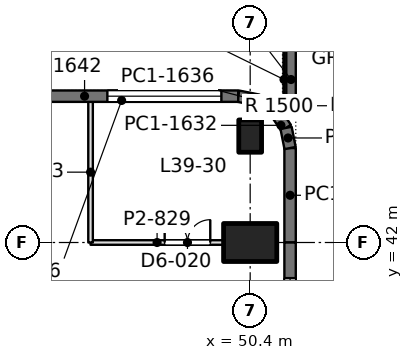
"""IFC4 building model, lengths in metres.
Left out: names, types, materials, properties, quantities, classifications, styles, units other than length and angle.
Written with IfcOpenShell. Run it as: python <this file> out.ifc"""

import sys

from ifc_helpers import new_model, si_unit, direction, frame, frame_2d, origin, origin_2d, place, context, subcontext, project, spatial, rectangle, extrude, element, fill, save


model = new_model("IFC4")
c1 = context("Model", 3, precision=1e-05, world=origin(), true_north=direction((0.0, 1.0)))
c2 = subcontext(c1, "Body", "Model", "MODEL_VIEW")
j1 = project(units=[si_unit("LENGTHUNIT", "METRE"), si_unit("PLANEANGLEUNIT", "RADIAN")], contexts=[c1])
p1 = place(None, origin())
s1 = spatial("IfcSite", under=j1, at=p1, CompositionType="ELEMENT")
p2 = place(p1, origin())
s2 = spatial("IfcBuilding", under=s1, at=p2, CompositionType="ELEMENT")
p3 = place(p2, frame((0.0, 0.0, 173.4)))
s3 = spatial("IfcBuildingStorey", under=s2, at=p3, CompositionType="ELEMENT", Elevation=173.4)
p4 = place(p3, frame((50.4, 42.0, 0.0), z_axis=(0.0, 0.0, 1.0), x_axis=(0.0, 1.0, 0.0)))
e1 = element("IfcColumn", 1, at=p4, inside=s3, PredefinedType="COLUMN", context=c2, shape_type="SweptSolid", body=[
    extrude(rectangle(XDim=1.0, YDim=1.4, at=origin_2d()), origin(), (0.0, 0.0, 1.0), 4.2),
])
p5 = place(p3, frame((50.4, 44.8, -0.36), z_axis=(0.0, 0.0, 1.0), x_axis=(1.0, 0.0, 0.0)))
e2 = element("IfcColumn", 2, at=p5, inside=s3, PredefinedType="COLUMN", context=c2, shape_type="SweptSolid", body=[
    extrude(rectangle(XDim=0.6, YDim=0.85, at=origin_2d()), origin(), (0.0, 0.0, 1.0), 4.56),
])
p6 = place(p3, frame((42.0, 45.85, 0.0), z_axis=(0.0, 0.0, 1.0), x_axis=(1.0, 0.0, 0.0)))
e3 = element("IfcWall", 3, at=p6, inside=s3, PredefinedType="SOLIDWALL", context=c2, shape_type="SweptSolid", body=[
    extrude(rectangle(XDim=8.085, YDim=0.3, at=frame_2d((4.042, 0.0))), origin(), (0.0, 0.0, 1.0), 4.05),
])
p7 = place(p6, frame((4.643, 0.0, 0.9)))
e4 = element("IfcOpeningElement", 4, at=p7, cuts=e3, PredefinedType="OPENING", context=c2, shape_type="SweptSolid", body=[
    extrude(rectangle(XDim=3.0, YDim=1.9, at=frame_2d((1.5, 0.95))), frame((0.0, 0.16, 0.0), z_axis=(0.0, -1.0, 0.0), x_axis=(1.0, 0.0, 0.0)), (0.0, 0.0, 1.0), 0.32),
])
p8 = place(p6, frame((1.443, 0.0, 0.0)))
e5 = element("IfcOpeningElement", 5, at=p8, cuts=e3, PredefinedType="OPENING", context=c2, shape_type="SweptSolid", body=[
    extrude(rectangle(XDim=1.0, YDim=2.4, at=frame_2d((0.5, 1.2))), frame((0.0, 0.16, 0.0), z_axis=(0.0, -1.0, 0.0), x_axis=(1.0, 0.0, 0.0)), (0.0, 0.0, 1.0), 0.32),
])
p9 = place(p3, frame((50.085, 45.85, 0.0), z_axis=(0.0, 0.0, 1.0), x_axis=(0.980702050465, -0.1955082817, 0.0)))
e6 = element("IfcWall", 6, at=p9, inside=s3, PredefinedType="SOLIDWALL", context=c2, shape_type="SweptSolid", body=[
    extrude(rectangle(XDim=0.541, YDim=0.3, at=frame_2d((0.271, 0.0))), origin(), (0.0, 0.0, 1.0), 4.05),
])
p10 = place(p3, frame((50.615, 45.744, 0.0), z_axis=(0.0, 0.0, 1.0), x_axis=(0.831692711774, -0.555236195849, 0.0)))
e7 = element("IfcWall", 7, at=p10, inside=s3, PredefinedType="SOLIDWALL", context=c2, shape_type="SweptSolid", body=[
    extrude(rectangle(XDim=0.525, YDim=0.3, at=frame_2d((0.263, 0.0))), origin(), (0.0, 0.0, 1.0), 4.05),
])
p11 = place(p3, frame((51.052, 45.453, 0.0), z_axis=(0.0, 0.0, 1.0), x_axis=(0.55534295404, -0.831621430339, 0.0)))
e8 = element("IfcWall", 8, at=p11, inside=s3, PredefinedType="SOLIDWALL", context=c2, shape_type="SweptSolid", body=[
    extrude(rectangle(XDim=0.526, YDim=0.3, at=frame_2d((0.263, 0.0))), origin(), (0.0, 0.0, 1.0), 4.05),
])
p12 = place(p3, frame((51.344, 45.015, 0.0), z_axis=(0.0, 0.0, 1.0), x_axis=(0.195073962632, -0.980788534345, 0.0)))
e9 = element("IfcWall", 9, at=p12, inside=s3, PredefinedType="SOLIDWALL", context=c2, shape_type="SweptSolid", body=[
    extrude(rectangle(XDim=0.541, YDim=0.3, at=frame_2d((0.271, 0.0))), origin(), (0.0, 0.0, 1.0), 4.05),
])
p13 = place(p3, frame((51.45, 44.485, 0.0), z_axis=(0.0, 0.0, 1.0), x_axis=(0.0, -1.0, 0.0)))
e10 = element("IfcWall", 10, at=p13, inside=s3, PredefinedType="SOLIDWALL", context=c2, shape_type="SweptSolid", body=[
    extrude(rectangle(XDim=2.485, YDim=0.3, at=frame_2d((1.243, 0.0))), origin(), (0.0, 0.0, 1.0), 4.05),
])
p14 = place(p3, frame((51.45, 42.0, 0.0), z_axis=(0.0, 0.0, 1.0), x_axis=(0.0, -1.0, 0.0)))
e11 = element("IfcWall", 11, at=p14, inside=s3, PredefinedType="SOLIDWALL", context=c2, shape_type="SweptSolid", body=[
    extrude(rectangle(XDim=4.275, YDim=0.3, at=frame_2d((2.137, 0.0))), origin(), (0.0, 0.0, 1.0), 4.05),
])
p15 = place(p14, frame((0.938, 0.0, 0.9)))
e12 = element("IfcOpeningElement", 12, at=p15, cuts=e11, PredefinedType="OPENING", context=c2, shape_type="SweptSolid", body=[
    extrude(rectangle(XDim=2.4, YDim=1.9, at=frame_2d((1.2, 0.95))), frame((0.0, 0.16, 0.0), z_axis=(0.0, -1.0, 0.0), x_axis=(1.0, 0.0, 0.0)), (0.0, 0.0, 1.0), 0.32),
])
p16 = place(p3, frame((51.475, 47.3, -0.16), z_axis=(0.0, 0.0, 1.0), x_axis=(0.0, -1.0, 0.0)))
e13 = element("IfcWall", 13, at=p16, inside=s3, PredefinedType="PARAPET", context=c2, shape_type="SweptSolid", body=[
    extrude(rectangle(XDim=2.023, YDim=0.25, at=frame_2d((1.012, 0.0))), origin(), (0.0, 0.0, 1.0), 1.26),
])
p17 = place(p3, frame((46.2, 42.0, 0.0), z_axis=(0.0, 0.0, 1.0), x_axis=(1.0, 0.0, 0.0)))
e14 = element("IfcWall", 14, at=p17, inside=s3, PredefinedType="PARTITIONING", context=c2, shape_type="SweptSolid", body=[
    extrude(rectangle(XDim=3.501, YDim=0.12, at=frame_2d((1.75, 0.0))), origin(), (0.0, 0.0, 1.0), 3.55),
])
p18 = place(p17, frame((1.95, 0.0, 0.0)))
e15 = element("IfcOpeningElement", 15, at=p18, cuts=e14, PredefinedType="OPENING", context=c2, shape_type="SweptSolid", body=[
    extrude(rectangle(XDim=1.2, YDim=2.2, at=frame_2d((0.6, 1.1))), frame((0.0, 0.07, 0.0), z_axis=(0.0, -1.0, 0.0), x_axis=(1.0, 0.0, 0.0)), (0.0, 0.0, 1.0), 0.14),
])
p19 = place(p3, frame((46.2, 42.0, 0.0), z_axis=(0.0, 0.0, 1.0), x_axis=(0.0, 1.0, 0.0)))
e16 = element("IfcWall", 16, at=p19, inside=s3, PredefinedType="PARTITIONING", context=c2, shape_type="SweptSolid", body=[
    extrude(rectangle(XDim=3.702, YDim=0.12, at=frame_2d((1.851, 0.0))), origin(), (0.0, 0.0, 1.0), 3.55),
])
p20 = place(p7, origin())
e17 = element("IfcWindow", 17, at=p20, inside=s3, PartitioningType="SINGLE_PANEL", PredefinedType="WINDOW", context=c2, shape_type="SweptSolid", body=[
    extrude(rectangle(XDim=3.0, YDim=1.9, at=frame_2d((1.5, 0.95))), frame((0.0, 0.03, 0.0), z_axis=(0.0, -1.0, 0.0), x_axis=(1.0, 0.0, 0.0)), (0.0, 0.0, 1.0), 0.06),
])
fill(e4, e17)
p21 = place(p15, origin())
e18 = element("IfcWindow", 18, at=p21, inside=s3, PartitioningType="SINGLE_PANEL", PredefinedType="WINDOW", context=c2, shape_type="SweptSolid", body=[
    extrude(rectangle(XDim=2.4, YDim=1.9, at=frame_2d((1.2, 0.95))), frame((0.0, 0.03, 0.0), z_axis=(0.0, -1.0, 0.0), x_axis=(1.0, 0.0, 0.0)), (0.0, 0.0, 1.0), 0.06),
])
fill(e12, e18)
p22 = place(p18, origin())
e19 = element("IfcDoor", 19, at=p22, inside=s3, OperationType="DOUBLE_DOOR_SINGLE_SWING_OPPOSITE_LEFT", PredefinedType="DOOR", context=c2, shape_type="SweptSolid", body=[
    extrude(rectangle(XDim=1.2, YDim=2.2, at=frame_2d((0.6, 1.1))), frame((0.0, 0.025, 0.0), z_axis=(0.0, -1.0, 0.0), x_axis=(1.0, 0.0, 0.0)), (0.0, 0.0, 1.0), 0.05),
])
fill(e15, e19)
save(model, sys.argv[1])
